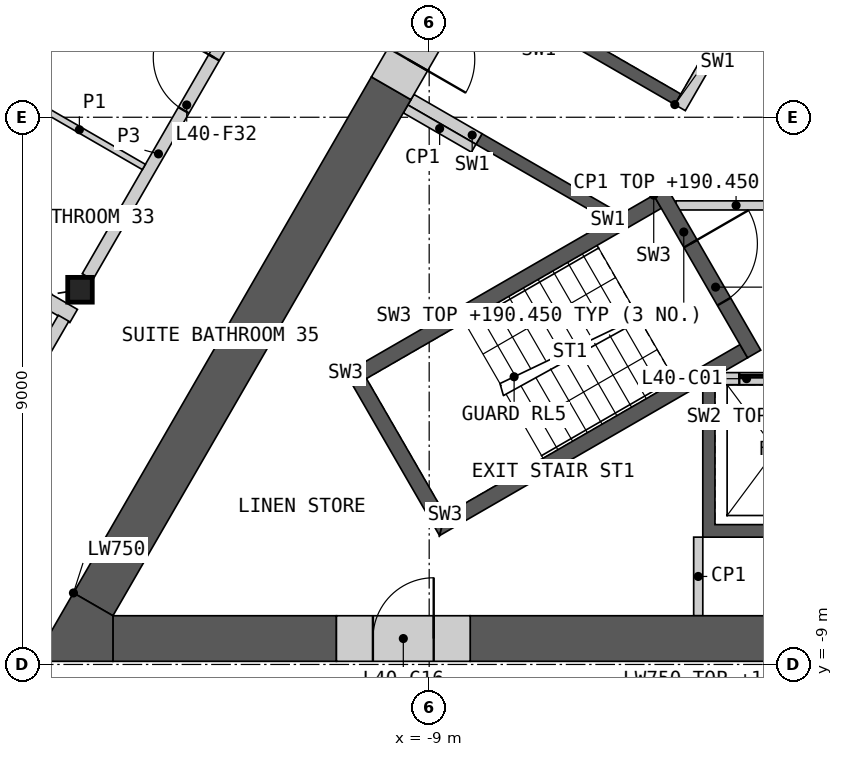
"""IFC4 building model, lengths in metres.
Left out: names, types, materials, properties, quantities, classifications, styles, units other than length and angle.
Written with IfcOpenShell. Run it as: python <this file> out.ifc"""

import sys

from ifc_helpers import new_model, si_unit, direction, frame, frame_2d, origin, origin_2d, place, context, subcontext, project, spatial, polyline, rectangle, i_section, outline, extrude, element, fill, save


model = new_model("IFC4")
c1 = context("Model", 3, precision=1e-05, world=origin(), true_north=direction((0.0, 1.0)))
c2 = subcontext(c1, "Body", "Model", "MODEL_VIEW")
j1 = project(units=[si_unit("LENGTHUNIT", "METRE"), si_unit("PLANEANGLEUNIT", "RADIAN")], contexts=[c1])
p1 = place(None, origin())
s1 = spatial("IfcSite", under=j1, at=p1, CompositionType="ELEMENT")
p2 = place(p1, origin())
s2 = spatial("IfcBuilding", under=s1, at=p2, CompositionType="ELEMENT")
p3 = place(p2, frame((0.0, 0.0, 187.2)))
s3 = spatial("IfcBuildingStorey", under=s2, at=p3, CompositionType="ELEMENT", Elevation=187.2)
p4 = place(p3, frame((-14.743, -2.837, 0.0), z_axis=(0.0, 0.0, 1.0), x_axis=(1.0, 0.0, 0.0)))
e1 = element("IfcColumn", 1, at=p4, inside=s3, PredefinedType="COLUMN", context=c2, shape_type="SweptSolid", body=[
    extrude(i_section(OverallWidth=0.404, OverallDepth=0.407, WebThickness=0.027, FlangeThickness=0.044, at=origin_2d()), origin(), (0.0, 0.0, 1.0), 3.6),
])
p5 = place(p3, origin())
e2 = element("IfcWall", 2, at=p5, inside=s3, PredefinedType="SHEAR", context=c2, shape_type="SweptSolid", body=[
    extrude(outline(polyline([(0.1, -4.4), (0.1, -6.906), (-4.5, -6.906), (-4.5, -4.4), (-4.3, -4.4), (-4.3, -6.7), (-2.3, -6.7), (-2.3, -4.4), (-2.1, -4.4), (-2.1, -6.7), (-0.1, -6.7), (-0.1, -4.4), (0.1, -4.4)])), origin(), (0.0, 0.0, 1.0), 3.25),
])
p6 = place(p3, frame((-4.187, -4.3, 0.0), z_axis=(0.0, 0.0, 1.0), x_axis=(1.0, 0.0, 0.0)))
e3 = element("IfcWall", 3, at=p6, inside=s3, PredefinedType="SOLIDWALL", context=c2, shape_type="SweptSolid", body=[
    extrude(rectangle(XDim=8.373, YDim=0.2, at=frame_2d((4.187, 0.0))), origin(), (0.0, 0.0, 1.0), 3.25),
])
p7 = place(p6, frame((0.287, 0.0, 0.0)))
e4 = element("IfcOpeningElement", 4, at=p7, cuts=e3, PredefinedType="OPENING", context=c2, shape_type="SweptSolid", body=[
    extrude(rectangle(XDim=1.2, YDim=2.1, at=frame_2d((0.6, 1.05))), frame((0.0, 0.11, 0.0), z_axis=(0.0, -1.0, 0.0), x_axis=(1.0, 0.0, 0.0)), (0.0, 0.0, 1.0), 0.22),
])
p8 = place(p6, frame((2.387, 0.0, 0.0)))
e5 = element("IfcOpeningElement", 5, at=p8, cuts=e3, PredefinedType="OPENING", context=c2, shape_type="SweptSolid", body=[
    extrude(rectangle(XDim=1.4, YDim=2.1, at=frame_2d((0.7, 1.05))), frame((0.0, 0.11, 0.0), z_axis=(0.0, -1.0, 0.0), x_axis=(1.0, 0.0, 0.0)), (0.0, 0.0, 1.0), 0.22),
])
p9 = place(p6, frame((4.837, 0.0, 0.0)))
e6 = element("IfcOpeningElement", 6, at=p9, cuts=e3, PredefinedType="OPENING", context=c2, shape_type="SweptSolid", body=[
    extrude(rectangle(XDim=0.9, YDim=2.1, at=frame_2d((0.45, 1.05))), frame((0.0, 0.11, 0.0), z_axis=(0.0, -1.0, 0.0), x_axis=(1.0, 0.0, 0.0)), (0.0, 0.0, 1.0), 0.22),
])
p10 = place(p6, frame((6.887, 0.0, 0.0)))
e7 = element("IfcOpeningElement", 7, at=p10, cuts=e3, PredefinedType="OPENING", context=c2, shape_type="SweptSolid", body=[
    extrude(rectangle(XDim=1.2, YDim=2.1, at=frame_2d((0.6, 1.05))), frame((0.0, 0.11, 0.0), z_axis=(0.0, -1.0, 0.0), x_axis=(1.0, 0.0, 0.0)), (0.0, 0.0, 1.0), 0.22),
])
p11 = place(p3, origin())
e8 = element("IfcWall", 8, at=p11, inside=s3, PredefinedType="SHEAR", context=c2, shape_type="SweptSolid", body=[
    extrude(outline(polyline([(-6.061, -1.697), (-8.231, -0.444), (-8.131, -0.271), (-5.96, -1.524), (-6.061, -1.697)])), origin(), (0.0, 0.0, 1.0), 3.25),
])
p12 = place(p3, origin())
e9 = element("IfcWall", 9, at=p12, inside=s3, PredefinedType="SHEAR", context=c2, shape_type="SweptSolid", body=[
    extrude(outline(polyline([(-4.96, 0.208), (-7.131, 1.461), (-3.731, 7.35), (-1.561, 6.097), (-1.66, 5.924), (-3.652, 7.074), (-4.652, 5.342), (-2.66, 4.192), (-2.76, 4.019), (-4.752, 5.169), (-5.752, 3.437), (-3.76, 2.287), (-3.861, 2.113), (-5.852, 3.263), (-6.852, 1.531), (-4.861, 0.381), (-4.96, 0.208)])), origin(), (0.0, 0.0, 1.0), 3.25),
])
p13 = place(p3, frame((-1.631, 5.776, 0.0), z_axis=(0.0, 0.0, 1.0), x_axis=(-0.499992876559, -0.866029516466, 0.0)))
e10 = element("IfcWall", 10, at=p13, inside=s3, PredefinedType="SOLIDWALL", context=c2, shape_type="SweptSolid", body=[
    extrude(rectangle(XDim=6.486, YDim=0.2, at=frame_2d((3.243, 0.0))), origin(), (0.0, 0.0, 1.0), 3.25),
])
p14 = place(p13, frame((0.337, 0.0, 0.0)))
e11 = element("IfcOpeningElement", 11, at=p14, cuts=e10, PredefinedType="OPENING", context=c2, shape_type="SweptSolid", body=[
    extrude(rectangle(XDim=1.1, YDim=2.1, at=frame_2d((0.55, 1.05))), frame((0.0, 0.11, 0.0), z_axis=(0.0, -1.0, 0.0), x_axis=(1.0, 0.0, 0.0)), (0.0, 0.0, 1.0), 0.22),
])
p15 = place(p13, frame((2.537, 0.0, 0.0)))
e12 = element("IfcOpeningElement", 12, at=p15, cuts=e10, PredefinedType="OPENING", context=c2, shape_type="SweptSolid", body=[
    extrude(rectangle(XDim=1.1, YDim=2.1, at=frame_2d((0.55, 1.05))), frame((0.0, 0.11, 0.0), z_axis=(0.0, -1.0, 0.0), x_axis=(1.0, 0.0, 0.0)), (0.0, 0.0, 1.0), 0.22),
])
p16 = place(p3, frame((-8.181, -0.357, 0.0), z_axis=(0.0, 0.0, 1.0), x_axis=(-0.866003189247, 0.500038474733, 0.0)))
e13 = element("IfcWall", 13, at=p16, inside=s3, PredefinedType="SHEAR", context=c2, shape_type="SweptSolid", body=[
    extrude(rectangle(XDim=1.293, YDim=0.2, at=frame_2d((0.646, 0.0))), origin(), (0.0, 0.0, 1.0), 3.25),
])
p17 = place(p3, frame((-4.941, -1.45, 0.0), z_axis=(0.0, 0.0, 1.0), x_axis=(1.0, 0.0, 0.0)))
e14 = element("IfcWall", 14, at=p17, inside=s3, PredefinedType="PARTITIONING", context=c2, shape_type="SweptSolid", body=[
    extrude(rectangle(XDim=9.882, YDim=0.15, at=frame_2d((4.941, 0.0))), origin(), (0.0, 0.0, 1.0), 3.25),
])
p18 = place(p17, frame((4.391, 0.0, 0.0)))
e15 = element("IfcOpeningElement", 15, at=p18, cuts=e14, PredefinedType="OPENING", context=c2, shape_type="SweptSolid", body=[
    extrude(rectangle(XDim=1.1, YDim=2.1, at=frame_2d((0.55, 1.05))), frame((0.0, 0.085, 0.0), z_axis=(0.0, -1.0, 0.0), x_axis=(1.0, 0.0, 0.0)), (0.0, 0.0, 1.0), 0.17),
])
p19 = place(p3, origin())
e16 = element("IfcWall", 16, at=p19, inside=s3, PredefinedType="SHEAR", context=c2, shape_type="SweptSolid", body=[
    extrude(outline(polyline([(-5.307, -1.281), (-10.374, -4.206), (-10.032, -4.298), (-5.182, -1.498), (-5.307, -1.281)])), origin(), (0.0, 0.0, 1.0), 3.25),
])
p20 = place(p3, origin())
e17 = element("IfcWall", 17, at=p20, inside=s3, PredefinedType="SHEAR", context=c2, shape_type="SweptSolid", body=[
    extrude(outline(polyline([(-10.374, -4.206), (-8.83, -6.881), (-8.738, -6.539), (-10.032, -4.298), (-10.374, -4.206)])), origin(), (0.0, 0.0, 1.0), 3.25),
])
p21 = place(p3, origin())
e18 = element("IfcWall", 18, at=p21, inside=s3, PredefinedType="SHEAR", context=c2, shape_type="SweptSolid", body=[
    extrude(outline(polyline([(-8.738, -6.539), (-8.83, -6.881), (-3.763, -3.956), (-3.888, -3.739), (-8.738, -6.539)])), origin(), (0.0, 0.0, 1.0), 3.25),
])
p22 = place(p3, frame((-5.199, -1.219, 0.0), z_axis=(0.0, 0.0, 1.0), x_axis=(0.499982516597, -0.866035497597, 0.0)))
e19 = element("IfcWall", 19, at=p22, inside=s3, PredefinedType="SHEAR", context=c2, shape_type="SweptSolid", body=[
    extrude(rectangle(XDim=3.088, YDim=0.25, at=frame_2d((1.544, 0.0))), origin(), (0.0, 0.0, 1.0), 3.25),
])
p23 = place(p22, frame((0.994, 0.0, 0.0)))
e20 = element("IfcOpeningElement", 20, at=p23, cuts=e19, PredefinedType="OPENING", context=c2, shape_type="SweptSolid", body=[
    extrude(rectangle(XDim=1.1, YDim=2.1, at=frame_2d((0.55, 1.05))), frame((0.0, 0.135, 0.0), z_axis=(0.0, -1.0, 0.0), x_axis=(1.0, 0.0, 0.0)), (0.0, 0.0, 1.0), 0.27),
])
for number, where, z_axis, x_axis in (
    (21, (-4.575, -6.906, 0.0), (0.0, 0.0, 1.0), (0.0, -1.0, 0.0)),
    (22, (-8.268, -0.509, 0.0), (0.0, 0.0, 1.0), (-0.866, 0.5, 0.0)),
):
    element("IfcWall", number, at=place(p3, frame(where, z_axis=z_axis, x_axis=x_axis)), inside=s3, PredefinedType="PARTITIONING", context=c2, shape_type="SweptSolid", body=[
        extrude(rectangle(XDim=1.293, YDim=0.15, at=frame_2d((0.646, 0.0))), origin(), (0.0, 0.0, 1.0), 3.25),
    ])
p24 = place(p3, frame((-8.325, -8.574, 0.0), z_axis=(0.0, 0.0, 1.0), x_axis=(1.0, 0.0, 0.0)))
e23 = element("IfcWall", 23, at=p24, inside=s3, PredefinedType="SHEAR", context=c2, shape_type="SweptSolid", body=[
    extrude(rectangle(XDim=4.926, YDim=0.75, at=frame_2d((2.463, 0.0))), origin(), (0.0, 0.0, 1.0), 3.25),
])
p25 = place(p3, frame((-14.201, -8.574, 0.0), z_axis=(0.0, 0.0, 1.0), x_axis=(1.0, 0.0, 0.0)))
e24 = element("IfcWall", 24, at=p25, inside=s3, PredefinedType="SHEAR", context=c2, shape_type="SweptSolid", body=[
    extrude(rectangle(XDim=3.676, YDim=0.75, at=frame_2d((1.838, 0.0))), origin(), (0.0, 0.0, 1.0), 3.25),
])
p26 = place(p3, frame((-9.625, 0.477, 0.0), z_axis=(0.0, 0.0, 1.0), x_axis=(-0.499986234705, -0.866033351035, 0.0)))
e25 = element("IfcWall", 25, at=p26, inside=s3, PredefinedType="SHEAR", context=c2, shape_type="SweptSolid", body=[
    extrude(rectangle(XDim=9.801, YDim=0.75, at=frame_2d((4.9, 0.0))), origin(), (0.0, 0.0, 1.0), 3.25),
])
p27 = place(p3, origin())
e26 = element("IfcWall", 26, at=p27, inside=s3, PredefinedType="SHEAR", context=c2, shape_type="SweptSolid", body=[
    extrude(outline(polyline([(-14.851, -7.824), (-14.201, -8.199), (-14.201, -8.949), (-15.5, -8.949), (-14.851, -7.824)])), origin(), (0.0, 0.0, 1.0), 3.25),
])
p28 = place(p3, frame((-10.525, -8.574, 0.0), z_axis=(0.0, 0.0, 1.0), x_axis=(1.0, 0.0, 0.0)))
e27 = element("IfcWall", 27, at=p28, inside=s3, PredefinedType="SHEAR", context=c2, shape_type="SweptSolid", body=[
    extrude(rectangle(XDim=2.2, YDim=0.75, at=frame_2d((1.1, 0.0))), origin(), (0.0, 0.0, 1.0), 3.25),
])
p29 = place(p28, frame((0.6, 0.0, 0.0)))
e28 = element("IfcOpeningElement", 28, at=p29, cuts=e27, PredefinedType="OPENING", context=c2, shape_type="SweptSolid", body=[
    extrude(rectangle(XDim=1.0, YDim=2.1, at=frame_2d((0.5, 1.05))), frame((0.0, 0.385, 0.0), z_axis=(0.0, -1.0, 0.0), x_axis=(1.0, 0.0, 0.0)), (0.0, 0.0, 1.0), 0.77),
])
p30 = place(p3, frame((-8.525, 2.382, 0.0), z_axis=(0.0, 0.0, 1.0), x_axis=(-0.500077893725, -0.86598042715, 0.0)))
e29 = element("IfcWall", 29, at=p30, inside=s3, PredefinedType="SHEAR", context=c2, shape_type="SweptSolid", body=[
    extrude(rectangle(XDim=2.2, YDim=0.75, at=frame_2d((1.1, 0.0))), origin(), (0.0, 0.0, 1.0), 3.25),
])
p31 = place(p30, frame((0.55, 0.0, 0.0)))
e30 = element("IfcOpeningElement", 30, at=p31, cuts=e29, PredefinedType="OPENING", context=c2, shape_type="SweptSolid", body=[
    extrude(rectangle(XDim=1.1, YDim=2.1, at=frame_2d((0.55, 1.05))), frame((0.0, 0.385, 0.0), z_axis=(0.0, -1.0, 0.0), x_axis=(1.0, 0.0, 0.0)), (0.0, 0.0, 1.0), 0.77),
])
p32 = place(p3, frame((-26.164, 3.265, 0.0), z_axis=(0.0, 0.0, 1.0), x_axis=(0.866021313335, -0.500007084799, 0.0)))
e31 = element("IfcWall", 31, at=p32, inside=s3, PredefinedType="PARTITIONING", context=c2, shape_type="SweptSolid", body=[
    extrude(rectangle(XDim=13.068, YDim=0.25, at=frame_2d((6.534, 0.0))), origin(), (0.0, 0.0, 1.0), 2.404),
])
p33 = place(p3, frame((-14.619, -2.624, 0.0), z_axis=(0.0, 0.0, 1.0), x_axis=(0.50000393355, 0.866023132736, 0.0)))
e32 = element("IfcWall", 32, at=p33, inside=s3, PredefinedType="PARTITIONING", context=c2, shape_type="SweptSolid", body=[
    extrude(rectangle(XDim=9.335, YDim=0.2, at=frame_2d((4.667, 0.0))), origin(), (0.0, 0.0, 1.0), 3.25),
])
p34 = place(p33, frame((4.77, 0.0, 0.0)))
e33 = element("IfcOpeningElement", 33, at=p34, cuts=e32, PredefinedType="OPENING", context=c2, shape_type="SweptSolid", body=[
    extrude(rectangle(XDim=1.0, YDim=2.1, at=frame_2d((0.5, 1.05))), frame((0.0, 0.11, 0.0), z_axis=(0.0, -1.0, 0.0), x_axis=(1.0, 0.0, 0.0)), (0.0, 0.0, 1.0), 0.22),
])
p35 = place(p33, frame((3.163, 0.0, 0.0)))
e34 = element("IfcOpeningElement", 34, at=p35, cuts=e32, PredefinedType="OPENING", context=c2, shape_type="SweptSolid", body=[
    extrude(rectangle(XDim=1.0, YDim=2.1, at=frame_2d((0.5, 1.05))), frame((0.0, 0.11, 0.0), z_axis=(0.0, -1.0, 0.0), x_axis=(1.0, 0.0, 0.0)), (0.0, 0.0, 1.0), 0.22),
])
p36 = place(p3, frame((-17.744, -8.035, 0.0), z_axis=(0.0, 0.0, 1.0), x_axis=(0.49998041698, 0.866036709751, 0.0)))
e35 = element("IfcWall", 35, at=p36, inside=s3, PredefinedType="PARTITIONING", context=c2, shape_type="SweptSolid", body=[
    extrude(rectangle(XDim=5.462, YDim=0.2, at=frame_2d((2.731, 0.0))), origin(), (0.0, 0.0, 1.0), 3.25),
])
p37 = place(p36, frame((0.352, 0.0, 0.0)))
e36 = element("IfcOpeningElement", 36, at=p37, cuts=e35, PredefinedType="OPENING", context=c2, shape_type="SweptSolid", body=[
    extrude(rectangle(XDim=1.1, YDim=2.1, at=frame_2d((0.55, 1.05))), frame((0.0, 0.11, 0.0), z_axis=(0.0, -1.0, 0.0), x_axis=(1.0, 0.0, 0.0)), (0.0, 0.0, 1.0), 0.22),
])
p38 = place(p3, frame((-15.814, 0.407, 0.0), z_axis=(0.0, 0.0, 1.0), x_axis=(0.866057815567, -0.499943856944, 0.0)))
e37 = element("IfcWall", 37, at=p38, inside=s3, PredefinedType="PARTITIONING", context=c2, shape_type="SweptSolid", body=[
    extrude(rectangle(XDim=2.45, YDim=0.1, at=frame_2d((1.225, 0.0))), origin(), (0.0, 0.0, 1.0), 2.404),
])
p39 = place(p7, origin())
e38 = element("IfcDoor", 38, at=p39, inside=s3, OperationType="SLIDING_TO_LEFT", PredefinedType="DOOR", context=c2, shape_type="SweptSolid", body=[
    extrude(rectangle(XDim=1.2, YDim=2.1, at=frame_2d((0.6, 1.05))), frame((0.0, 0.025, 0.0), z_axis=(0.0, -1.0, 0.0), x_axis=(1.0, 0.0, 0.0)), (0.0, 0.0, 1.0), 0.05),
])
fill(e4, e38)
p40 = place(p23, origin())
e39 = element("IfcDoor", 39, at=p40, inside=s3, OperationType="SINGLE_SWING_LEFT", PredefinedType="DOOR", context=c2, shape_type="SweptSolid", body=[
    extrude(rectangle(XDim=1.1, YDim=2.1, at=frame_2d((0.55, 1.05))), frame((0.0, 0.025, 0.0), z_axis=(0.0, -1.0, 0.0), x_axis=(1.0, 0.0, 0.0)), (0.0, 0.0, 1.0), 0.05),
])
fill(e20, e39)
p41 = place(p29, origin())
e40 = element("IfcDoor", 40, at=p41, inside=s3, OperationType="SINGLE_SWING_RIGHT", PredefinedType="DOOR", context=c2, shape_type="SweptSolid", body=[
    extrude(rectangle(XDim=1.0, YDim=2.1, at=frame_2d((0.5, 1.05))), frame((0.0, 0.13, 0.0), z_axis=(0.0, -1.0, 0.0), x_axis=(1.0, 0.0, 0.0)), (0.0, 0.0, 1.0), 0.05),
])
fill(e28, e40)
p42 = place(p31, origin())
e41 = element("IfcDoor", 41, at=p42, inside=s3, OperationType="SINGLE_SWING_RIGHT", PredefinedType="DOOR", context=c2, shape_type="SweptSolid", body=[
    extrude(rectangle(XDim=1.1, YDim=2.1, at=frame_2d((0.55, 1.05))), frame((0.0, 0.13, 0.0), z_axis=(0.0, -1.0, 0.0), x_axis=(1.0, 0.0, 0.0)), (0.0, 0.0, 1.0), 0.05),
])
fill(e30, e41)
p43 = place(p35, origin())
e42 = element("IfcDoor", 42, at=p43, inside=s3, OperationType="SINGLE_SWING_RIGHT", PredefinedType="DOOR", context=c2, shape_type="SweptSolid", body=[
    extrude(rectangle(XDim=1.0, YDim=2.1, at=frame_2d((0.5, 1.05))), frame((0.0, 0.025, 0.0), z_axis=(0.0, -1.0, 0.0), x_axis=(1.0, 0.0, 0.0)), (0.0, 0.0, 1.0), 0.05),
])
fill(e34, e42)
save(model, sys.argv[1])
